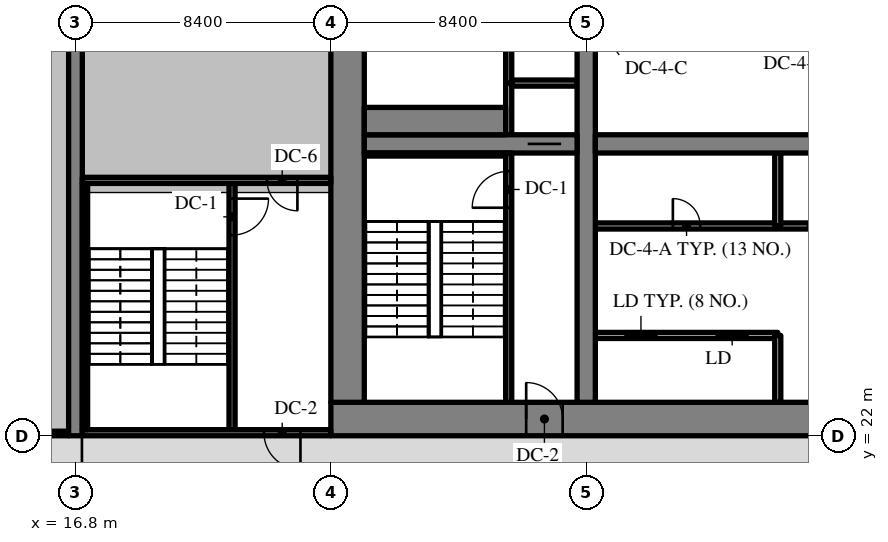
"""IFC4 building model, lengths in metres.
Left out: names, types, materials, properties, quantities, classifications, styles, units other than length and angle.
Written with IfcOpenShell. Run it as: python <this file> out.ifc"""

import sys

from ifc_helpers import new_model, si_unit, direction, frame, frame_2d, origin, place, context, subcontext, project, spatial, rectangle, extrude, source, transform, mapped, element, fill, save


model = new_model("IFC4")
c1 = context("Model", 3, precision=1e-05, world=origin(), true_north=direction((0.0, 1.0)))
c2 = subcontext(c1, "Body", "Model", "MODEL_VIEW")
j1 = project(units=[si_unit("LENGTHUNIT", "METRE"), si_unit("PLANEANGLEUNIT", "RADIAN")], contexts=[c1])
p1 = place(None, origin())
s1 = spatial("IfcSite", under=j1, at=p1, CompositionType="ELEMENT")
p2 = place(p1, origin())
s2 = spatial("IfcBuilding", under=s1, at=p2, CompositionType="ELEMENT")
p3 = place(p2, frame((0.0, 0.0, -9.0)))
s3 = spatial("IfcBuildingStorey", under=s2, at=p3, CompositionType="ELEMENT", Elevation=-9.0)
m1 = source(origin(), c2, "Body", "SweptSolid", [
    extrude(rectangle(XDim=50.4, YDim=1.1, at=frame_2d((25.2, 0.0))), origin(), (0.0, 0.0, 1.0), 4.22),
])
p4 = place(p3, frame((25.2, 22.55, 0.0), z_axis=(0.0, 0.0, 1.0), x_axis=(1.0, 0.0, 0.0)))
e1 = element("IfcWall", 1, at=p4, inside=s3, PredefinedType="SHEAR", context=c2, shape_type="MappedRepresentation", body=[
    mapped(m1, transform((0.0, 0.0, 0.0), scale=1.0)),
])
m2 = source(origin(), c2, "Body", "SweptSolid", [
    extrude(rectangle(XDim=1.8, YDim=2.1, at=frame_2d((0.9, 1.05))), frame((0.0, 0.56, 0.0), z_axis=(0.0, -1.0, 0.0), x_axis=(1.0, 0.0, 0.0)), (0.0, 0.0, 1.0), 1.12),
])
p5 = place(p4, frame((15.9, 0.0, 0.0)))
e2 = element("IfcOpeningElement", 2, at=p5, cuts=e1, PredefinedType="OPENING", context=c2, shape_type="MappedRepresentation", body=[
    mapped(m2, transform((0.0, 0.0, 0.0), scale=1.0)),
])
m3 = source(origin(), c2, "Body", "SweptSolid", [
    extrude(rectangle(XDim=1.2, YDim=2.1, at=frame_2d((0.6, 1.05))), frame((0.0, 0.56, 0.0), z_axis=(0.0, -1.0, 0.0), x_axis=(1.0, 0.0, 0.0)), (0.0, 0.0, 1.0), 1.12),
])
p6 = place(p4, frame((27.0, 0.0, 0.0)))
e3 = element("IfcOpeningElement", 3, at=p6, cuts=e1, PredefinedType="OPENING", context=c2, shape_type="MappedRepresentation", body=[
    mapped(m3, transform((0.0, 0.0, 0.0), scale=1.0)),
])
m4 = source(origin(), c2, "Body", "SweptSolid", [
    extrude(rectangle(XDim=0.9, YDim=2.1, at=frame_2d((0.45, 1.05))), frame((0.0, 0.56, 0.0), z_axis=(0.0, -1.0, 0.0), x_axis=(1.0, 0.0, 0.0)), (0.0, 0.0, 1.0), 1.12),
])
p7 = place(p4, frame((33.75, 0.0, 0.0)))
e4 = element("IfcOpeningElement", 4, at=p7, cuts=e1, PredefinedType="OPENING", context=c2, shape_type="MappedRepresentation", body=[
    mapped(m4, transform((0.0, 0.0, 0.0), scale=1.0)),
])
p8 = place(p4, frame((30.75, 0.0, 0.0)))
e5 = element("IfcOpeningElement", 5, at=p8, cuts=e1, PredefinedType="OPENING", context=c2, shape_type="MappedRepresentation", body=[
    mapped(m4, transform((0.0, 0.0, 0.0), scale=1.0)),
])
p9 = place(p4, frame((38.25, 0.0, 0.0)))
e6 = element("IfcOpeningElement", 6, at=p9, cuts=e1, PredefinedType="OPENING", context=c2, shape_type="MappedRepresentation", body=[
    mapped(m4, transform((0.0, 0.0, 0.0), scale=1.0)),
])
p10 = place(p4, frame((6.425, 0.0, 0.0)))
e7 = element("IfcOpeningElement", 7, at=p10, cuts=e1, PredefinedType="OPENING", context=c2, shape_type="MappedRepresentation", body=[
    mapped(m3, transform((0.0, 0.0, 0.0), scale=1.0)),
])
p11 = place(p4, frame((47.675, 0.0, 0.0)))
e8 = element("IfcOpeningElement", 8, at=p11, cuts=e1, PredefinedType="OPENING", context=c2, shape_type="MappedRepresentation", body=[
    mapped(m3, transform((0.0, 0.0, 0.0), scale=1.0)),
])
m5 = source(origin(), c2, "Body", "SweptSolid", [
    extrude(rectangle(XDim=17.8, YDim=1.1, at=frame_2d((8.9, 0.0))), origin(), (0.0, 0.0, 1.0), 4.22),
])
p12 = place(p3, frame((25.75, 23.1, 0.0), z_axis=(0.0, 0.0, 1.0), x_axis=(0.0, 1.0, 0.0)))
e9 = element("IfcWall", 9, at=p12, inside=s3, PredefinedType="SHEAR", context=c2, shape_type="MappedRepresentation", body=[
    mapped(m5, transform((0.0, 0.0, 0.0), scale=1.0)),
])
m6 = source(origin(), c2, "Body", "SweptSolid", [
    extrude(rectangle(XDim=17.8, YDim=0.6, at=frame_2d((8.9, 0.0))), origin(), (0.0, 0.0, 1.0), 4.22),
])
p13 = place(p3, frame((33.6, 23.1, 0.0), z_axis=(0.0, 0.0, 1.0), x_axis=(0.0, 1.0, 0.0)))
e10 = element("IfcWall", 10, at=p13, inside=s3, PredefinedType="SHEAR", context=c2, shape_type="MappedRepresentation", body=[
    mapped(m6, transform((0.0, 0.0, 0.0), scale=1.0)),
])
m7 = source(origin(), c2, "Body", "SweptSolid", [
    extrude(rectangle(XDim=1.1, YDim=2.1, at=frame_2d((0.55, 1.05))), frame((0.0, 0.31, 0.0), z_axis=(0.0, -1.0, 0.0), x_axis=(1.0, 0.0, 0.0)), (0.0, 0.0, 1.0), 0.62),
])
p14 = place(p13, frame((12.35, 0.0, 0.0)))
e11 = element("IfcOpeningElement", 11, at=p14, cuts=e10, PredefinedType="OPENING", context=c2, shape_type="MappedRepresentation", body=[
    mapped(m7, transform((0.0, 0.0, 0.0), scale=1.0)),
])
m8 = source(origin(), c2, "Body", "SweptSolid", [
    extrude(rectangle(XDim=7.0, YDim=0.6, at=frame_2d((3.5, 0.0))), origin(), (0.0, 0.0, 1.0), 4.22),
])
p15 = place(p3, frame((26.3, 31.6, 0.0), z_axis=(0.0, 0.0, 1.0), x_axis=(1.0, 0.0, 0.0)))
e12 = element("IfcWall", 12, at=p15, inside=s3, PredefinedType="SHEAR", context=c2, shape_type="MappedRepresentation", body=[
    mapped(m8, transform((0.0, 0.0, 0.0), scale=1.0)),
])
p16 = place(p15, frame((5.375, 0.0, 0.0)))
e13 = element("IfcOpeningElement", 13, at=p16, cuts=e12, PredefinedType="OPENING", context=c2, shape_type="MappedRepresentation", body=[
    mapped(m7, transform((0.0, 0.0, 0.0), scale=1.0)),
])
m9 = source(origin(), c2, "Body", "SweptSolid", [
    extrude(rectangle(XDim=16.2, YDim=0.6, at=frame_2d((8.1, 0.0))), origin(), (0.0, 0.0, 1.0), 4.22),
])
p17 = place(p3, frame((33.9, 31.6, 0.0), z_axis=(0.0, 0.0, 1.0), x_axis=(1.0, 0.0, 0.0)))
e14 = element("IfcWall", 14, at=p17, inside=s3, PredefinedType="SHEAR", context=c2, shape_type="MappedRepresentation", body=[
    mapped(m9, transform((0.0, 0.0, 0.0), scale=1.0)),
])
m10 = source(origin(), c2, "Body", "SweptSolid", [
    extrude(rectangle(XDim=1.0, YDim=2.1, at=frame_2d((0.5, 1.05))), frame((0.0, 0.31, 0.0), z_axis=(0.0, -1.0, 0.0), x_axis=(1.0, 0.0, 0.0)), (0.0, 0.0, 1.0), 0.62),
])
p18 = place(p17, frame((14.65, 0.0, 0.0)))
e15 = element("IfcOpeningElement", 15, at=p18, cuts=e14, PredefinedType="OPENING", context=c2, shape_type="MappedRepresentation", body=[
    mapped(m10, transform((0.0, 0.0, 0.0), scale=1.0)),
])
m11 = source(origin(), c2, "Body", "SweptSolid", [
    extrude(rectangle(XDim=20.0, YDim=0.45, at=frame_2d((10.0, 0.0))), origin(), (0.0, 0.0, 1.0), 4.22),
])
p19 = place(p3, frame((16.8, 22.0, 0.0), z_axis=(0.0, 0.0, 1.0), x_axis=(0.0, 1.0, 0.0)))
e16 = element("IfcWall", 16, at=p19, inside=s3, PredefinedType="SHEAR", context=c2, shape_type="MappedRepresentation", body=[
    mapped(m11, transform((0.0, 0.0, 0.0), scale=1.0)),
])
m12 = source(origin(), c2, "Body", "SweptSolid", [
    extrude(rectangle(XDim=6.0, YDim=0.2, at=frame_2d((3.0, 0.0))), origin(), (0.0, 0.0, 1.0), 4.22),
])
p20 = place(p3, frame((33.9, 25.3, 0.0), z_axis=(0.0, 0.0, 1.0), x_axis=(1.0, 0.0, 0.0)))
e17 = element("IfcWall", 17, at=p20, inside=s3, PredefinedType="SOLIDWALL", context=c2, shape_type="MappedRepresentation", body=[
    mapped(m12, transform((0.0, 0.0, 0.0), scale=1.0)),
])
m13 = source(origin(), c2, "Body", "SweptSolid", [
    extrude(rectangle(XDim=1.1, YDim=2.1, at=frame_2d((0.55, 1.05))), frame((0.0, 0.11, 0.0), z_axis=(0.0, -1.0, 0.0), x_axis=(1.0, 0.0, 0.0)), (0.0, 0.0, 1.0), 0.22),
])
p21 = place(p20, frame((0.95, 0.0, 0.0)))
e18 = element("IfcOpeningElement", 18, at=p21, cuts=e17, PredefinedType="OPENING", context=c2, shape_type="MappedRepresentation", body=[
    mapped(m13, transform((0.0, 0.0, 0.0), scale=1.0)),
])
p22 = place(p20, frame((3.95, 0.0, 0.0)))
e19 = element("IfcOpeningElement", 19, at=p22, cuts=e17, PredefinedType="OPENING", context=c2, shape_type="MappedRepresentation", body=[
    mapped(m13, transform((0.0, 0.0, 0.0), scale=1.0)),
])
m14 = source(origin(), c2, "Body", "SweptSolid", [
    extrude(rectangle(XDim=12.0, YDim=0.2, at=frame_2d((6.0, 0.0))), origin(), (0.0, 0.0, 1.0), 4.22),
])
p23 = place(p3, frame((33.9, 28.9, 0.0), z_axis=(0.0, 0.0, 1.0), x_axis=(1.0, 0.0, 0.0)))
e20 = element("IfcWall", 20, at=p23, inside=s3, PredefinedType="SOLIDWALL", context=c2, shape_type="MappedRepresentation", body=[
    mapped(m14, transform((0.0, 0.0, 0.0), scale=1.0)),
])
p24 = place(p23, frame((6.95, 0.0, 0.0)))
e21 = element("IfcOpeningElement", 21, at=p24, cuts=e20, PredefinedType="OPENING", context=c2, shape_type="MappedRepresentation", body=[
    mapped(m13, transform((0.0, 0.0, 0.0), scale=1.0)),
])
p25 = place(p23, frame((9.95, 0.0, 0.0)))
e22 = element("IfcOpeningElement", 22, at=p25, cuts=e20, PredefinedType="OPENING", context=c2, shape_type="MappedRepresentation", body=[
    mapped(m13, transform((0.0, 0.0, 0.0), scale=1.0)),
])
m15 = source(origin(), c2, "Body", "SweptSolid", [
    extrude(rectangle(XDim=0.9, YDim=2.1, at=frame_2d((0.45, 1.05))), frame((0.0, 0.11, 0.0), z_axis=(0.0, -1.0, 0.0), x_axis=(1.0, 0.0, 0.0)), (0.0, 0.0, 1.0), 0.22),
])
p26 = place(p23, frame((2.55, 0.0, 0.0)))
e23 = element("IfcOpeningElement", 23, at=p26, cuts=e20, PredefinedType="OPENING", context=c2, shape_type="MappedRepresentation", body=[
    mapped(m15, transform((0.0, 0.0, 0.0), scale=1.0)),
])
m16 = source(origin(), c2, "Body", "SweptSolid", [
    extrude(rectangle(XDim=2.2, YDim=0.2, at=frame_2d((1.1, 0.0))), origin(), (0.0, 0.0, 1.0), 4.22),
])
p27 = place(p3, frame((39.9, 23.1, 0.0), z_axis=(0.0, 0.0, 1.0), x_axis=(0.0, 1.0, 0.0)))
e24 = element("IfcWall", 24, at=p27, inside=s3, PredefinedType="SOLIDWALL", context=c2, shape_type="MappedRepresentation", body=[
    mapped(m16, transform((0.0, 0.0, 0.0), scale=1.0)),
])
m17 = source(origin(), c2, "Body", "SweptSolid", [
    extrude(rectangle(XDim=2.4, YDim=0.2, at=frame_2d((1.2, 0.0))), origin(), (0.0, 0.0, 1.0), 4.22),
])
p28 = place(p3, frame((39.9, 28.9, 0.0), z_axis=(0.0, 0.0, 1.0), x_axis=(0.0, 1.0, 0.0)))
e25 = element("IfcWall", 25, at=p28, inside=s3, PredefinedType="PARTITIONING", context=c2, shape_type="MappedRepresentation", body=[
    mapped(m17, transform((0.0, 0.0, 0.0), scale=1.0)),
])
m18 = source(origin(), c2, "Body", "SweptSolid", [
    extrude(rectangle(XDim=8.2, YDim=0.2, at=frame_2d((4.1, 0.0))), origin(), (0.0, 0.0, 1.0), 4.22),
])
p29 = place(p3, frame((31.05, 23.1, 0.0), z_axis=(0.0, 0.0, 1.0), x_axis=(0.0, 1.0, 0.0)))
e26 = element("IfcWall", 26, at=p29, inside=s3, PredefinedType="SOLIDWALL", context=c2, shape_type="MappedRepresentation", body=[
    mapped(m18, transform((0.0, 0.0, 0.0), scale=1.0)),
])
m19 = source(origin(), c2, "Body", "SweptSolid", [
    extrude(rectangle(XDim=1.2, YDim=2.1, at=frame_2d((0.6, 1.05))), frame((0.0, 0.11, 0.0), z_axis=(0.0, -1.0, 0.0), x_axis=(1.0, 0.0, 0.0)), (0.0, 0.0, 1.0), 0.22),
])
p30 = place(p29, frame((6.4, 0.0, 0.0)))
e27 = element("IfcOpeningElement", 27, at=p30, cuts=e26, PredefinedType="OPENING", context=c2, shape_type="MappedRepresentation", body=[
    mapped(m19, transform((0.0, 0.0, 0.0), scale=1.0)),
])
m20 = source(origin(), c2, "Body", "SweptSolid", [
    extrude(rectangle(XDim=1.7, YDim=0.2, at=frame_2d((0.85, 0.0))), origin(), (0.0, 0.0, 1.0), 4.22),
])
p31 = place(p3, frame((31.05, 31.9, 0.0), z_axis=(0.0, 0.0, 1.0), x_axis=(0.0, 1.0, 0.0)))
e28 = element("IfcWall", 28, at=p31, inside=s3, PredefinedType="SOLIDWALL", context=c2, shape_type="MappedRepresentation", body=[
    mapped(m20, transform((0.0, 0.0, 0.0), scale=1.0)),
])
m21 = source(origin(), c2, "Body", "SweptSolid", [
    extrude(rectangle(XDim=2.15, YDim=0.2, at=frame_2d((1.075, 0.0))), origin(), (0.0, 0.0, 1.0), 4.22),
])
p32 = place(p3, frame((31.15, 33.6, 0.0), z_axis=(0.0, 0.0, 1.0), x_axis=(1.0, 0.0, 0.0)))
e29 = element("IfcWall", 29, at=p32, inside=s3, PredefinedType="SOLIDWALL", context=c2, shape_type="MappedRepresentation", body=[
    mapped(m21, transform((0.0, 0.0, 0.0), scale=1.0)),
])
m22 = source(origin(), c2, "Body", "SweptSolid", [
    extrude(rectangle(XDim=7.3, YDim=0.2, at=frame_2d((3.65, 0.0))), origin(), (0.0, 0.0, 1.0), 4.22),
])
p33 = place(p3, frame((31.05, 33.6, 0.0), z_axis=(0.0, 0.0, 1.0), x_axis=(0.0, 1.0, 0.0)))
e30 = element("IfcWall", 30, at=p33, inside=s3, PredefinedType="SOLIDWALL", context=c2, shape_type="MappedRepresentation", body=[
    mapped(m22, transform((0.0, 0.0, 0.0), scale=1.0)),
])
m23 = source(origin(), c2, "Body", "SweptSolid", [
    extrude(rectangle(XDim=1.8, YDim=2.1, at=frame_2d((0.9, 1.05))), frame((0.0, 0.11, 0.0), z_axis=(0.0, -1.0, 0.0), x_axis=(1.0, 0.0, 0.0)), (0.0, 0.0, 1.0), 0.22),
])
p34 = place(p33, frame((5.3, 0.0, 0.0)))
e31 = element("IfcOpeningElement", 31, at=p34, cuts=e30, PredefinedType="OPENING", context=c2, shape_type="MappedRepresentation", body=[
    mapped(m23, transform((0.0, 0.0, 0.0), scale=1.0)),
])
m24 = source(origin(), c2, "Body", "SweptSolid", [
    extrude(rectangle(XDim=8.3, YDim=0.2, at=frame_2d((4.15, 0.0))), origin(), (0.0, 0.0, 1.0), 4.22),
])
p35 = place(p3, frame((21.95, 22.1, 0.0), z_axis=(0.0, 0.0, 1.0), x_axis=(0.0, 1.0, 0.0)))
e32 = element("IfcWall", 32, at=p35, inside=s3, PredefinedType="SOLIDWALL", context=c2, shape_type="MappedRepresentation", body=[
    mapped(m24, transform((0.0, 0.0, 0.0), scale=1.0)),
])
p36 = place(p35, frame((6.5, 0.0, 0.0)))
e33 = element("IfcOpeningElement", 33, at=p36, cuts=e32, PredefinedType="OPENING", context=c2, shape_type="MappedRepresentation", body=[
    mapped(m19, transform((0.0, 0.0, 0.0), scale=1.0)),
])
m25 = source(origin(), c2, "Body", "SweptSolid", [
    extrude(rectangle(XDim=8.175, YDim=0.2, at=frame_2d((4.087, 0.0))), origin(), (0.0, 0.0, 1.0), 4.22),
])
p37 = place(p3, frame((17.025, 22.1, 0.0), z_axis=(0.0, 0.0, 1.0), x_axis=(1.0, 0.0, 0.0)))
e34 = element("IfcWall", 34, at=p37, inside=s3, PredefinedType="SOLIDWALL", context=c2, shape_type="MappedRepresentation", body=[
    mapped(m25, transform((0.0, 0.0, 0.0), scale=1.0)),
])
p38 = place(p37, frame((5.975, 0.0, 0.0)))
e35 = element("IfcOpeningElement", 35, at=p38, cuts=e34, PredefinedType="OPENING", context=c2, shape_type="MappedRepresentation", body=[
    mapped(m19, transform((0.0, 0.0, 0.0), scale=1.0)),
])
p39 = place(p3, frame((17.025, 30.4, 0.0), z_axis=(0.0, 0.0, 1.0), x_axis=(1.0, 0.0, 0.0)))
e36 = element("IfcWall", 36, at=p39, inside=s3, PredefinedType="SOLIDWALL", context=c2, shape_type="MappedRepresentation", body=[
    mapped(m25, transform((0.0, 0.0, 0.0), scale=1.0)),
])
m26 = source(origin(), c2, "Body", "SweptSolid", [
    extrude(rectangle(XDim=1.0, YDim=2.1, at=frame_2d((0.5, 1.05))), frame((0.0, 0.11, 0.0), z_axis=(0.0, -1.0, 0.0), x_axis=(1.0, 0.0, 0.0)), (0.0, 0.0, 1.0), 0.22),
])
p40 = place(p39, frame((6.075, 0.0, 0.0)))
e37 = element("IfcOpeningElement", 37, at=p40, cuts=e36, PredefinedType="OPENING", context=c2, shape_type="MappedRepresentation", body=[
    mapped(m26, transform((0.0, 0.0, 0.0), scale=1.0)),
])
m27 = source(origin(), c2, "Body", "SweptSolid", [
    extrude(rectangle(XDim=4.65, YDim=0.1, at=frame_2d((2.325, 0.0))), origin(), (0.0, 0.0, 1.0), 4.22),
])
p41 = place(p3, frame((26.3, 31.25, 0.0), z_axis=(0.0, 0.0, 1.0), x_axis=(1.0, 0.0, 0.0)))
e38 = element("IfcWall", 38, at=p41, inside=s3, PredefinedType="SOLIDWALL", context=c2, shape_type="MappedRepresentation", body=[
    mapped(m27, transform((0.0, 0.0, 0.0), scale=1.0)),
])
m28 = source(origin(), c2, "Body", "SweptSolid", [
    extrude(rectangle(XDim=8.1, YDim=0.175, at=frame_2d((4.05, 0.0))), origin(), (0.0, 0.0, 1.0), 4.22),
])
p42 = place(p3, frame((17.112, 22.2, 0.0), z_axis=(0.0, 0.0, 1.0), x_axis=(0.0, 1.0, 0.0)))
e39 = element("IfcWall", 39, at=p42, inside=s3, PredefinedType="SOLIDWALL", context=c2, shape_type="MappedRepresentation", body=[
    mapped(m28, transform((0.0, 0.0, 0.0), scale=1.0)),
])
m29 = source(origin(), c2, "Body", "SweptSolid", [
    extrude(rectangle(XDim=4.65, YDim=0.9, at=frame_2d((2.325, 0.0))), origin(), (0.0, 0.0, 1.0), 4.22),
])
p43 = place(p3, frame((26.3, 32.35, 0.0), z_axis=(0.0, 0.0, 1.0), x_axis=(1.0, 0.0, 0.0)))
e40 = element("IfcWall", 40, at=p43, inside=s3, PredefinedType="SOLIDWALL", context=c2, shape_type="MappedRepresentation", body=[
    mapped(m29, transform((0.0, 0.0, 0.0), scale=1.0)),
])
m30 = source(origin(), c2, "Body", "SweptSolid", [
    extrude(rectangle(XDim=7.95, YDim=0.15, at=frame_2d((3.975, 0.0))), origin(), (0.0, 0.0, 1.0), 4.22),
])
p44 = place(p3, frame((8.625, 22.075, 0.0), z_axis=(0.0, 0.0, 1.0), x_axis=(1.0, 0.0, 0.0)))
e41 = element("IfcWall", 41, at=p44, inside=s3, PredefinedType="PARTITIONING", context=c2, shape_type="MappedRepresentation", body=[
    mapped(m30, transform((0.0, 0.0, 0.0), scale=1.0)),
])
m31 = source(origin(), c2, "Body", "SweptSolid", [
    extrude(rectangle(XDim=1.1, YDim=2.1, at=frame_2d((0.55, 1.05))), frame((0.0, 0.025, 0.0), z_axis=(0.0, -1.0, 0.0), x_axis=(1.0, 0.0, 0.0)), (0.0, 0.0, 1.0), 0.05),
])
p45 = place(p21, origin())
e42 = element("IfcDoor", 42, at=p45, inside=s3, OperationType="SLIDING_TO_LEFT", PredefinedType="DOOR", context=c2, shape_type="MappedRepresentation", body=[
    mapped(m31, transform((0.0, 0.0, 0.0), scale=1.0)),
])
fill(e18, e42)
p46 = place(p22, origin())
e43 = element("IfcDoor", 43, at=p46, inside=s3, OperationType="SLIDING_TO_RIGHT", PredefinedType="DOOR", context=c2, shape_type="MappedRepresentation", body=[
    mapped(m31, transform((0.0, 0.0, 0.0), scale=1.0)),
])
fill(e19, e43)
p47 = place(p24, origin())
e44 = element("IfcDoor", 44, at=p47, inside=s3, OperationType="SLIDING_TO_LEFT", PredefinedType="DOOR", context=c2, shape_type="MappedRepresentation", body=[
    mapped(m31, transform((0.0, 0.0, 0.0), scale=1.0)),
])
fill(e21, e44)
m32 = source(origin(), c2, "Body", "SweptSolid", [
    extrude(rectangle(XDim=0.9, YDim=2.1, at=frame_2d((0.45, 1.05))), frame((0.0, 0.025, 0.0), z_axis=(0.0, -1.0, 0.0), x_axis=(1.0, 0.0, 0.0)), (0.0, 0.0, 1.0), 0.05),
])
p48 = place(p26, origin())
e45 = element("IfcDoor", 45, at=p48, inside=s3, OperationType="SINGLE_SWING_LEFT", PredefinedType="DOOR", context=c2, shape_type="MappedRepresentation", body=[
    mapped(m32, transform((0.0, 0.0, 0.0), scale=1.0)),
])
fill(e23, e45)
m33 = source(origin(), c2, "Body", "SweptSolid", [
    extrude(rectangle(XDim=1.2, YDim=2.1, at=frame_2d((0.6, 1.05))), frame((0.0, 0.025, 0.0), z_axis=(0.0, -1.0, 0.0), x_axis=(1.0, 0.0, 0.0)), (0.0, 0.0, 1.0), 0.05),
])
p49 = place(p30, origin())
e46 = element("IfcDoor", 46, at=p49, inside=s3, OperationType="SINGLE_SWING_LEFT", PredefinedType="DOOR", context=c2, shape_type="MappedRepresentation", body=[
    mapped(m33, transform((0.0, 0.0, 0.0), scale=1.0)),
])
fill(e27, e46)
m34 = source(origin(), c2, "Body", "SweptSolid", [
    extrude(rectangle(XDim=1.2, YDim=2.1, at=frame_2d((0.6, 1.05))), frame((0.0, 0.325, 0.0), z_axis=(0.0, -1.0, 0.0), x_axis=(1.0, 0.0, 0.0)), (0.0, 0.0, 1.0), 0.05),
])
p50 = place(p10, origin())
e47 = element("IfcDoor", 47, at=p50, inside=s3, OperationType="SINGLE_SWING_LEFT", PredefinedType="DOOR", context=c2, shape_type="MappedRepresentation", body=[
    mapped(m34, transform((0.0, 0.0, 0.0), scale=1.0)),
])
fill(e7, e47)
p51 = place(p16, origin())
e48 = element("IfcDoor", 48, at=p51, inside=s3, OperationType="SLIDING_TO_RIGHT", PredefinedType="DOOR", context=c2, shape_type="MappedRepresentation", body=[
    mapped(m31, transform((0.0, 0.0, 0.0), scale=1.0)),
])
fill(e13, e48)
p52 = place(p36, origin())
e49 = element("IfcDoor", 49, at=p52, inside=s3, OperationType="SINGLE_SWING_RIGHT", PredefinedType="DOOR", context=c2, shape_type="MappedRepresentation", body=[
    mapped(m33, transform((0.0, 0.0, 0.0), scale=1.0)),
])
fill(e33, e49)
p53 = place(p38, origin())
e50 = element("IfcDoor", 50, at=p53, inside=s3, OperationType="SINGLE_SWING_RIGHT", PredefinedType="DOOR", context=c2, shape_type="MappedRepresentation", body=[
    mapped(m33, transform((0.0, 0.0, 0.0), scale=1.0)),
])
fill(e35, e50)
m35 = source(origin(), c2, "Body", "SweptSolid", [
    extrude(rectangle(XDim=1.0, YDim=2.1, at=frame_2d((0.5, 1.05))), frame((0.0, 0.025, 0.0), z_axis=(0.0, -1.0, 0.0), x_axis=(1.0, 0.0, 0.0)), (0.0, 0.0, 1.0), 0.05),
])
p54 = place(p40, origin())
e51 = element("IfcDoor", 51, at=p54, inside=s3, OperationType="SINGLE_SWING_RIGHT", PredefinedType="DOOR", context=c2, shape_type="MappedRepresentation", body=[
    mapped(m35, transform((0.0, 0.0, 0.0), scale=1.0)),
])
fill(e37, e51)
save(model, sys.argv[1])
